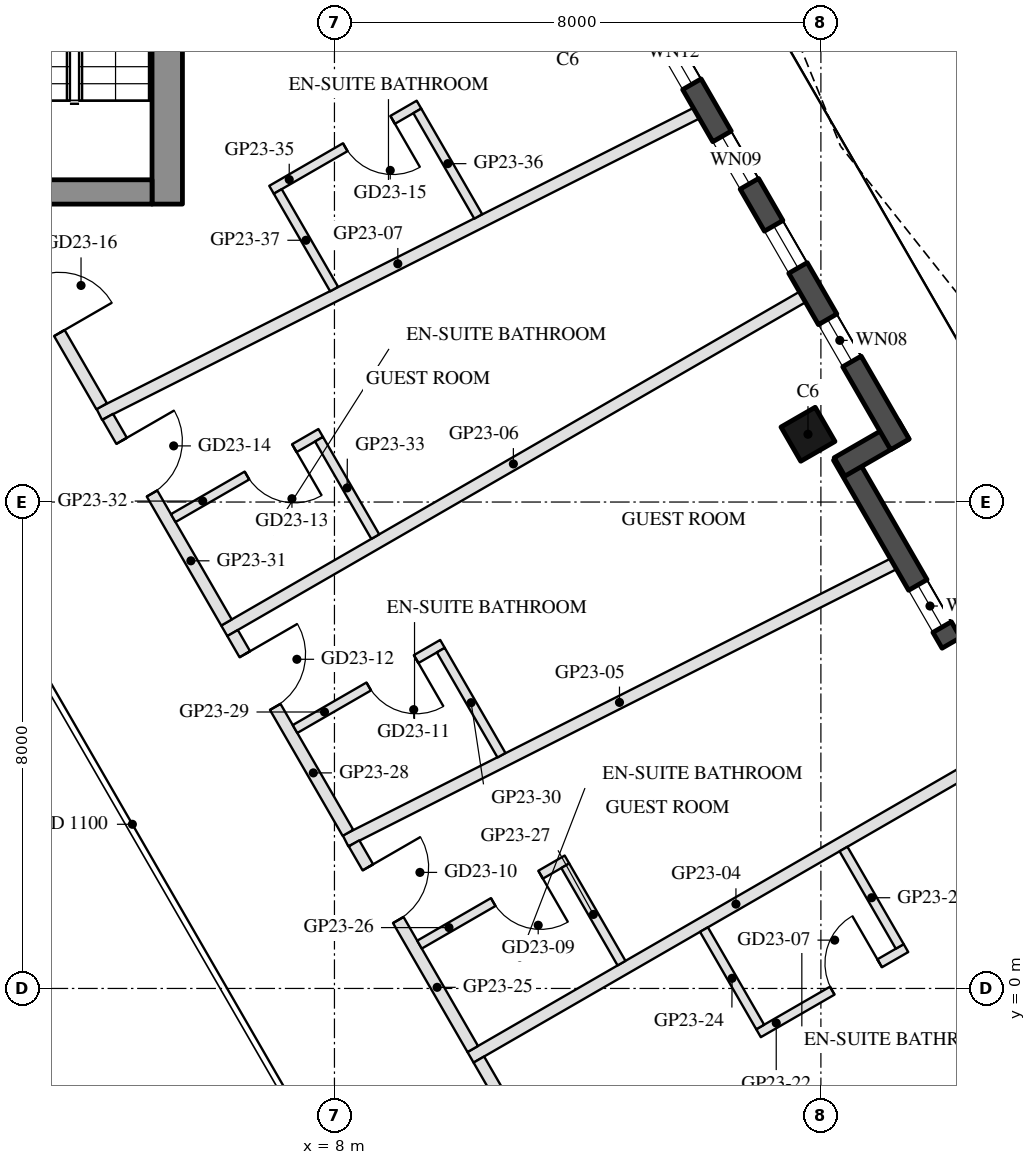
"""IFC4 building model, lengths in metres.
Left out: names, types, materials, properties, quantities, classifications, styles, units other than length and angle.
Written with IfcOpenShell. Run it as: python <this file> out.ifc"""

import sys

from ifc_helpers import new_model, si_unit, direction, frame, frame_2d, origin, origin_2d, place, context, subcontext, project, spatial, rectangle, hollow_rectangle, extrude, boolean, halfspace, element, fill, save


model = new_model("IFC4")
c1 = context("Model", 3, precision=1e-05, world=origin(), true_north=direction((0.0, 1.0)))
c2 = subcontext(c1, "Body", "Model", "MODEL_VIEW")
j1 = project(units=[si_unit("LENGTHUNIT", "METRE"), si_unit("PLANEANGLEUNIT", "RADIAN")], contexts=[c1])
p1 = place(None, origin())
s1 = spatial("IfcSite", under=j1, at=p1, CompositionType="ELEMENT")
p2 = place(p1, origin())
s2 = spatial("IfcBuilding", under=s1, at=p2, CompositionType="ELEMENT")
p3 = place(p2, frame((0.0, 0.0, 250.4)))
s3 = spatial("IfcBuildingStorey", under=s2, at=p3, CompositionType="ELEMENT", Elevation=250.4)
p4 = place(p3, frame((15.788, 9.115, 0.0), z_axis=(0.0, 0.0, 1.0), x_axis=(-0.5, 0.866025403784, 0.0)))
e1 = element("IfcColumn", 1, at=p4, inside=s3, PredefinedType="COLUMN", context=c2, shape_type="SweptSolid", body=[
    boolean("DIFFERENCE", extrude(hollow_rectangle(XDim=0.65, YDim=0.65, WallThickness=0.03, at=origin_2d()), origin(), (0.0, 0.0, 1.0), 3.7), halfspace(frame((0.0, 0.0, 3.663), z_axis=(0.0, 0.0, 1.0), x_axis=(1.0, 0.0, 0.0)), False)),
])
p5 = place(p3, frame((19.729, 2.938, 0.0), z_axis=(0.0, 0.0, 1.0), x_axis=(-0.499976430342, 0.866039011305, 0.0)))
e2 = element("IfcWall", 2, at=p5, inside=s3, PredefinedType="SOLIDWALL", context=c2, shape_type="SweptSolid", body=[
    extrude(rectangle(XDim=6.74, YDim=0.35, at=frame_2d((3.37, 0.0))), origin(), (0.0, 0.0, 1.0), 3.55),
])
p6 = place(p5, frame((1.67, 0.0, 0.0)))
e3 = element("IfcOpeningElement", 3, at=p6, cuts=e2, PredefinedType="OPENING", context=c2, shape_type="SweptSolid", body=[
    extrude(rectangle(XDim=1.5, YDim=2.4, at=frame_2d((0.75, 1.2))), frame((0.0, 0.185, 0.0), z_axis=(0.0, -1.0, 0.0), x_axis=(1.0, 0.0, 0.0)), (0.0, 0.0, 1.0), 0.37),
])
p7 = place(p5, frame((3.47, 0.0, 0.3)))
e4 = element("IfcOpeningElement", 4, at=p7, cuts=e2, PredefinedType="OPENING", context=c2, shape_type="SweptSolid", body=[
    extrude(rectangle(XDim=0.8, YDim=2.65, at=frame_2d((0.4, 1.325))), frame((0.0, 0.185, 0.0), z_axis=(0.0, -1.0, 0.0), x_axis=(1.0, 0.0, 0.0)), (0.0, 0.0, 1.0), 0.37),
])
p8 = place(p3, frame((16.306, 8.577, 0.0), z_axis=(0.0, 0.0, 1.0), x_axis=(0.866092288191, 0.499884134912, 0.0)))
e5 = element("IfcWall", 5, at=p8, inside=s3, PredefinedType="SOLIDWALL", context=c2, shape_type="SweptSolid", body=[
    extrude(rectangle(XDim=1.22, YDim=0.35, at=frame_2d((0.61, 0.0))), origin(), (0.0, 0.0, 1.0), 3.55),
])
p9 = place(p3, frame((17.299, 8.948, 0.0), z_axis=(0.0, 0.0, 1.0), x_axis=(-0.500010041276, 0.866019606374, 0.0)))
e6 = element("IfcWall", 6, at=p9, inside=s3, PredefinedType="SOLIDWALL", context=c2, shape_type="SweptSolid", body=[
    extrude(rectangle(XDim=9.7, YDim=0.35, at=frame_2d((4.85, 0.0))), origin(), (0.0, 0.0, 1.0), 3.55),
])
p10 = place(p9, frame((1.575, 0.0, 0.3)))
e7 = element("IfcOpeningElement", 7, at=p10, cuts=e6, PredefinedType="OPENING", context=c2, shape_type="SweptSolid", body=[
    extrude(rectangle(XDim=0.8, YDim=2.65, at=frame_2d((0.4, 1.325))), frame((0.0, 0.185, 0.0), z_axis=(0.0, -1.0, 0.0), x_axis=(1.0, 0.0, 0.0)), (0.0, 0.0, 1.0), 0.37),
])
p11 = place(p9, frame((3.351, 0.0, 0.3)))
e8 = element("IfcOpeningElement", 8, at=p11, cuts=e6, PredefinedType="OPENING", context=c2, shape_type="SweptSolid", body=[
    extrude(rectangle(XDim=0.8, YDim=2.65, at=frame_2d((0.4, 1.325))), frame((0.0, 0.185, 0.0), z_axis=(0.0, -1.0, 0.0), x_axis=(1.0, 0.0, 0.0)), (0.0, 0.0, 1.0), 0.37),
])
p12 = place(p9, frame((4.949, 0.0, 0.3)))
e9 = element("IfcOpeningElement", 9, at=p12, cuts=e6, PredefinedType="OPENING", context=c2, shape_type="SweptSolid", body=[
    extrude(rectangle(XDim=0.9, YDim=2.65, at=frame_2d((0.45, 1.325))), frame((0.0, 0.185, 0.0), z_axis=(0.0, -1.0, 0.0), x_axis=(1.0, 0.0, 0.0)), (0.0, 0.0, 1.0), 0.37),
])
p13 = place(p9, frame((6.84, 0.0, 0.3)))
e10 = element("IfcOpeningElement", 10, at=p13, cuts=e6, PredefinedType="OPENING", context=c2, shape_type="SweptSolid", body=[
    extrude(rectangle(XDim=1.2, YDim=2.65, at=frame_2d((0.6, 1.325))), frame((0.0, 0.185, 0.0), z_axis=(0.0, -1.0, 0.0), x_axis=(1.0, 0.0, 0.0)), (0.0, 0.0, 1.0), 0.37),
])
p14 = place(p3, frame((5.25, 12.9, 0.0), z_axis=(0.0, 0.0, 1.0), x_axis=(0.0, 1.0, 0.0)))
e11 = element("IfcWall", 11, at=p14, inside=s3, PredefinedType="SHEAR", context=c2, shape_type="SweptSolid", body=[
    extrude(rectangle(XDim=14.837, YDim=0.5, at=frame_2d((7.418, 0.0))), origin(), (0.0, 0.0, 1.0), 3.5),
])
p15 = place(p3, frame((5.0, 13.1, 0.0), z_axis=(0.0, 0.0, 1.0), x_axis=(-1.0, 0.0, 0.0)))
e12 = element("IfcWall", 12, at=p15, inside=s3, PredefinedType="SHEAR", context=c2, shape_type="SweptSolid", body=[
    extrude(rectangle(XDim=10.0, YDim=0.4, at=frame_2d((5.0, 0.0))), origin(), (0.0, 0.0, 1.0), 3.5),
])
p16 = place(p15, frame((3.55, 0.0, 0.0)))
e13 = element("IfcOpeningElement", 13, at=p16, cuts=e12, PredefinedType="OPENING", context=c2, shape_type="SweptSolid", body=[
    extrude(rectangle(XDim=1.1, YDim=2.1, at=frame_2d((0.55, 1.05))), frame((0.0, 0.21, 0.0), z_axis=(0.0, -1.0, 0.0), x_axis=(1.0, 0.0, 0.0)), (0.0, 0.0, 1.0), 0.42),
])
p17 = place(p15, frame((5.85, 0.0, 0.0)))
e14 = element("IfcOpeningElement", 14, at=p17, cuts=e12, PredefinedType="OPENING", context=c2, shape_type="SweptSolid", body=[
    extrude(rectangle(XDim=1.4, YDim=2.1, at=frame_2d((0.7, 1.05))), frame((0.0, 0.21, 0.0), z_axis=(0.0, -1.0, 0.0), x_axis=(1.0, 0.0, 0.0)), (0.0, 0.0, 1.0), 0.42),
])
p18 = place(p3, frame((18.968, 3.907, 0.0), z_axis=(0.0, 0.0, 1.0), x_axis=(-0.866022637375, -0.500004791531, 0.0)))
e15 = element("IfcWall", 15, at=p18, inside=s3, PredefinedType="PARTITIONING", context=c2, shape_type="SweptSolid", body=[
    extrude(rectangle(XDim=10.08, YDim=0.2, at=frame_2d((5.04, 0.0))), origin(), (0.0, 0.0, 1.0), 3.1),
])
p19 = place(p3, frame((17.192, 6.982, 0.0), z_axis=(0.0, 0.0, 1.0), x_axis=(-0.892469554868, -0.451107629766, 0.0)))
e16 = element("IfcWall", 16, at=p19, inside=s3, PredefinedType="PARTITIONING", context=c2, shape_type="SweptSolid", body=[
    extrude(rectangle(XDim=10.096, YDim=0.2, at=frame_2d((5.048, 0.0))), origin(), (0.0, 0.0, 1.0), 3.1),
])
p20 = place(p3, frame((15.697, 11.372, 0.0), z_axis=(0.0, 0.0, 1.0), x_axis=(-0.866027479907, -0.499996404033, 0.0)))
e17 = element("IfcWall", 17, at=p20, inside=s3, PredefinedType="PARTITIONING", context=c2, shape_type="SweptSolid", body=[
    extrude(rectangle(XDim=10.98, YDim=0.2, at=frame_2d((5.49, 0.0))), origin(), (0.0, 0.0, 1.0), 3.1),
])
p21 = place(p3, frame((13.952, 14.395, 0.0), z_axis=(0.0, 0.0, 1.0), x_axis=(-0.892890171934, -0.450274517226, 0.0)))
e18 = element("IfcWall", 18, at=p21, inside=s3, PredefinedType="PARTITIONING", context=c2, shape_type="SweptSolid", body=[
    extrude(rectangle(XDim=10.998, YDim=0.2, at=frame_2d((5.499, 0.0))), origin(), (0.0, 0.0, 1.0), 3.1),
])
p22 = place(p3, frame((10.375, -1.169, 0.0), z_axis=(0.0, 0.0, 1.0), x_axis=(0.500055316652, -0.865993464345, 0.0)))
e19 = element("IfcWall", 19, at=p22, inside=s3, PredefinedType="PARTITIONING", context=c2, shape_type="SweptSolid", body=[
    extrude(rectangle(XDim=3.788, YDim=0.2, at=frame_2d((1.894, 0.0))), origin(), (0.0, 0.0, 1.0), 2.95),
])
p23 = place(p22, frame((1.394, 0.0, 0.0)))
e20 = element("IfcOpeningElement", 20, at=p23, cuts=e19, PredefinedType="OPENING", context=c2, shape_type="SweptSolid", body=[
    extrude(rectangle(XDim=1.0, YDim=2.1, at=frame_2d((0.5, 1.05))), frame((0.0, 0.11, 0.0), z_axis=(0.0, -1.0, 0.0), x_axis=(1.0, 0.0, 0.0)), (0.0, 0.0, 1.0), 0.22),
])
p24 = place(p3, frame((14.974, -0.737, 0.0), z_axis=(0.0, 0.0, 1.0), x_axis=(0.866018616679, 0.500011755427, 0.0)))
e21 = element("IfcWall", 21, at=p24, inside=s3, PredefinedType="PARTITIONING", context=c2, shape_type="SweptSolid", body=[
    extrude(rectangle(XDim=2.8, YDim=0.15, at=frame_2d((1.4, 0.0))), origin(), (0.0, 0.0, 1.0), 3.55),
])
p25 = place(p24, frame((1.4, 0.0, 0.0)))
e22 = element("IfcOpeningElement", 22, at=p25, cuts=e21, PredefinedType="OPENING", context=c2, shape_type="SweptSolid", body=[
    extrude(rectangle(XDim=0.9, YDim=2.1, at=frame_2d((0.45, 1.05))), frame((0.0, 0.085, 0.0), z_axis=(0.0, -1.0, 0.0), x_axis=(1.0, 0.0, 0.0)), (0.0, 0.0, 1.0), 0.17),
])
p26 = place(p3, frame((17.297, 0.691, 0.0), z_axis=(0.0, 0.0, 1.0), x_axis=(-0.499985172903, 0.866033964044, 0.0)))
e23 = element("IfcWall", 23, at=p26, inside=s3, PredefinedType="PARTITIONING", context=c2, shape_type="SweptSolid", body=[
    extrude(rectangle(XDim=1.85, YDim=0.15, at=frame_2d((0.925, 0.0))), origin(), (0.0, 0.0, 1.0), 2.95),
])
p27 = place(p3, frame((15.002, -0.634, 0.0), z_axis=(0.0, 0.0, 1.0), x_axis=(-0.500042316284, 0.866000971088, 0.0)))
e24 = element("IfcWall", 24, at=p27, inside=s3, PredefinedType="PARTITIONING", context=c2, shape_type="SweptSolid", body=[
    extrude(rectangle(XDim=1.85, YDim=0.15, at=frame_2d((0.925, 0.0))), origin(), (0.0, 0.0, 1.0), 2.95),
])
p28 = place(p3, frame((8.322, 2.386, 0.0), z_axis=(0.0, 0.0, 1.0), x_axis=(0.499998439657, -0.866026304647, 0.0)))
e25 = element("IfcWall", 25, at=p28, inside=s3, PredefinedType="PARTITIONING", context=c2, shape_type="SweptSolid", body=[
    extrude(rectangle(XDim=3.905, YDim=0.2, at=frame_2d((1.953, 0.0))), origin(), (0.0, 0.0, 1.0), 2.95),
])
p29 = place(p28, frame((0.455, 0.0, 0.0)))
e26 = element("IfcOpeningElement", 26, at=p29, cuts=e25, PredefinedType="OPENING", context=c2, shape_type="SweptSolid", body=[
    extrude(rectangle(XDim=1.0, YDim=2.1, at=frame_2d((0.5, 1.05))), frame((0.0, 0.11, 0.0), z_axis=(0.0, -1.0, 0.0), x_axis=(1.0, 0.0, 0.0)), (0.0, 0.0, 1.0), 0.22),
])
p30 = place(p3, frame((11.823, 2.121, 0.0), z_axis=(0.0, 0.0, 1.0), x_axis=(-0.866034573852, -0.49998411664, 0.0)))
e27 = element("IfcWall", 27, at=p30, inside=s3, PredefinedType="PARTITIONING", context=c2, shape_type="SweptSolid", body=[
    extrude(rectangle(XDim=2.8, YDim=0.15, at=frame_2d((1.4, 0.0))), origin(), (0.0, 0.0, 1.0), 2.95),
])
p31 = place(p30, frame((0.5, 0.0, 0.0)))
e28 = element("IfcOpeningElement", 28, at=p31, cuts=e27, PredefinedType="OPENING", context=c2, shape_type="SweptSolid", body=[
    extrude(rectangle(XDim=0.9, YDim=2.1, at=frame_2d((0.45, 1.05))), frame((0.0, 0.085, 0.0), z_axis=(0.0, -1.0, 0.0), x_axis=(1.0, 0.0, 0.0)), (0.0, 0.0, 1.0), 0.17),
])
p32 = place(p3, frame((12.721, 0.416, 0.0), z_axis=(0.0, 0.0, 1.0), x_axis=(-0.499985172903, 0.866033964044, 0.0)))
e29 = element("IfcWall", 29, at=p32, inside=s3, PredefinedType="PARTITIONING", context=c2, shape_type="SweptSolid", body=[
    extrude(rectangle(XDim=1.85, YDim=0.15, at=frame_2d((0.925, 0.0))), origin(), (0.0, 0.0, 1.0), 3.55),
])
p33 = place(p3, frame((6.325, 5.845, 0.0), z_axis=(0.0, 0.0, 1.0), x_axis=(0.499973105789, -0.866040930607, 0.0)))
e30 = element("IfcWall", 30, at=p33, inside=s3, PredefinedType="PARTITIONING", context=c2, shape_type="SweptSolid", body=[
    extrude(rectangle(XDim=3.794, YDim=0.2, at=frame_2d((1.897, 0.0))), origin(), (0.0, 0.0, 1.0), 2.95),
])
p34 = place(p33, frame((0.403, 0.0, 0.0)))
e31 = element("IfcOpeningElement", 31, at=p34, cuts=e30, PredefinedType="OPENING", context=c2, shape_type="SweptSolid", body=[
    extrude(rectangle(XDim=1.0, YDim=2.1, at=frame_2d((0.5, 1.05))), frame((0.0, 0.11, 0.0), z_axis=(0.0, -1.0, 0.0), x_axis=(1.0, 0.0, 0.0)), (0.0, 0.0, 1.0), 0.22),
])
p35 = place(p3, frame((9.776, 5.667, 0.0), z_axis=(0.0, 0.0, 1.0), x_axis=(-0.866034573852, -0.49998411664, 0.0)))
e32 = element("IfcWall", 32, at=p35, inside=s3, PredefinedType="PARTITIONING", context=c2, shape_type="SweptSolid", body=[
    extrude(rectangle(XDim=2.8, YDim=0.15, at=frame_2d((1.4, 0.0))), origin(), (0.0, 0.0, 1.0), 2.95),
])
p36 = place(p35, frame((0.5, 0.0, 0.0)))
e33 = element("IfcOpeningElement", 33, at=p36, cuts=e32, PredefinedType="OPENING", context=c2, shape_type="SweptSolid", body=[
    extrude(rectangle(XDim=0.9, YDim=2.1, at=frame_2d((0.45, 1.05))), frame((0.0, 0.085, 0.0), z_axis=(0.0, -1.0, 0.0), x_axis=(1.0, 0.0, 0.0)), (0.0, 0.0, 1.0), 0.17),
])
p37 = place(p3, frame((10.747, 3.836, 0.0), z_axis=(0.0, 0.0, 1.0), x_axis=(-0.499980071345, 0.866036909293, 0.0)))
e34 = element("IfcWall", 34, at=p37, inside=s3, PredefinedType="PARTITIONING", context=c2, shape_type="SweptSolid", body=[
    extrude(rectangle(XDim=1.996, YDim=0.15, at=frame_2d((0.998, 0.0))), origin(), (0.0, 0.0, 1.0), 2.95),
])
p38 = place(p3, frame((4.272, 9.401, 0.0), z_axis=(0.0, 0.0, 1.0), x_axis=(0.499998439657, -0.866026304647, 0.0)))
e35 = element("IfcWall", 35, at=p38, inside=s3, PredefinedType="PARTITIONING", context=c2, shape_type="SweptSolid", body=[
    extrude(rectangle(XDim=3.905, YDim=0.2, at=frame_2d((1.953, 0.0))), origin(), (0.0, 0.0, 1.0), 2.95),
])
p39 = place(p38, frame((0.456, 0.0, 0.0)))
e36 = element("IfcOpeningElement", 36, at=p39, cuts=e35, PredefinedType="OPENING", context=c2, shape_type="SweptSolid", body=[
    extrude(rectangle(XDim=1.0, YDim=2.1, at=frame_2d((0.5, 1.05))), frame((0.0, 0.11, 0.0), z_axis=(0.0, -1.0, 0.0), x_axis=(1.0, 0.0, 0.0)), (0.0, 0.0, 1.0), 0.22),
])
p40 = place(p3, frame((7.774, 9.136, 0.0), z_axis=(0.0, 0.0, 1.0), x_axis=(-0.866056369097, -0.49994636267, 0.0)))
e37 = element("IfcWall", 37, at=p40, inside=s3, PredefinedType="PARTITIONING", context=c2, shape_type="SweptSolid", body=[
    extrude(rectangle(XDim=2.8, YDim=0.15, at=frame_2d((1.4, 0.0))), origin(), (0.0, 0.0, 1.0), 2.95),
])
p41 = place(p40, frame((0.5, 0.0, 0.0)))
e38 = element("IfcOpeningElement", 38, at=p41, cuts=e37, PredefinedType="OPENING", context=c2, shape_type="SweptSolid", body=[
    extrude(rectangle(XDim=0.9, YDim=2.1, at=frame_2d((0.45, 1.05))), frame((0.0, 0.085, 0.0), z_axis=(0.0, -1.0, 0.0), x_axis=(1.0, 0.0, 0.0)), (0.0, 0.0, 1.0), 0.17),
])
p42 = place(p3, frame((8.671, 7.431, 0.0), z_axis=(0.0, 0.0, 1.0), x_axis=(-0.500042316284, 0.866000971088, 0.0)))
e39 = element("IfcWall", 39, at=p42, inside=s3, PredefinedType="PARTITIONING", context=c2, shape_type="SweptSolid", body=[
    extrude(rectangle(XDim=1.85, YDim=0.15, at=frame_2d((0.925, 0.0))), origin(), (0.0, 0.0, 1.0), 2.95),
])
p43 = place(p3, frame((2.281, 12.85, 0.0), z_axis=(0.0, 0.0, 1.0), x_axis=(0.499985062256, -0.866034027923, 0.0)))
e40 = element("IfcWall", 40, at=p43, inside=s3, PredefinedType="PARTITIONING", context=c2, shape_type="SweptSolid", body=[
    extrude(rectangle(XDim=3.782, YDim=0.2, at=frame_2d((1.891, 0.0))), origin(), (0.0, 0.0, 1.0), 2.95),
])
p44 = place(p43, frame((1.391, 0.0, 0.0)))
e41 = element("IfcOpeningElement", 41, at=p44, cuts=e40, PredefinedType="OPENING", context=c2, shape_type="SweptSolid", body=[
    extrude(rectangle(XDim=1.0, YDim=2.1, at=frame_2d((0.5, 1.05))), frame((0.0, 0.11, 0.0), z_axis=(0.0, -1.0, 0.0), x_axis=(1.0, 0.0, 0.0)), (0.0, 0.0, 1.0), 0.22),
])
p45 = place(p3, frame((9.39, 14.536, 0.0), z_axis=(0.0, 0.0, 1.0), x_axis=(-0.866034573852, -0.49998411664, 0.0)))
e42 = element("IfcWall", 42, at=p45, inside=s3, PredefinedType="PARTITIONING", context=c2, shape_type="SweptSolid", body=[
    extrude(rectangle(XDim=2.8, YDim=0.15, at=frame_2d((1.4, 0.0))), origin(), (0.0, 0.0, 1.0), 2.95),
])
p46 = place(p45, frame((0.5, 0.0, 0.0)))
e43 = element("IfcOpeningElement", 43, at=p46, cuts=e42, PredefinedType="OPENING", context=c2, shape_type="SweptSolid", body=[
    extrude(rectangle(XDim=0.9, YDim=2.1, at=frame_2d((0.45, 1.05))), frame((0.0, 0.085, 0.0), z_axis=(0.0, -1.0, 0.0), x_axis=(1.0, 0.0, 0.0)), (0.0, 0.0, 1.0), 0.17),
])
p47 = place(p3, frame((10.365, 12.698, 0.0), z_axis=(0.0, 0.0, 1.0), x_axis=(-0.500056363668, 0.86599285976, 0.0)))
e44 = element("IfcWall", 44, at=p47, inside=s3, PredefinedType="PARTITIONING", context=c2, shape_type="SweptSolid", body=[
    extrude(rectangle(XDim=2.004, YDim=0.15, at=frame_2d((1.002, 0.0))), origin(), (0.0, 0.0, 1.0), 2.95),
])
p48 = place(p3, frame((7.995, 11.502, 0.0), z_axis=(0.0, 0.0, 1.0), x_axis=(-0.4999770169, 0.866038672677, 0.0)))
e45 = element("IfcWall", 45, at=p48, inside=s3, PredefinedType="PARTITIONING", context=c2, shape_type="SweptSolid", body=[
    extrude(rectangle(XDim=1.854, YDim=0.15, at=frame_2d((0.927, 0.0))), origin(), (0.0, 0.0, 1.0), 2.95),
])
p49 = place(p6, frame((1.5, 0.0, 0.0), z_axis=(0.0, 0.0, 1.0), x_axis=(-1.0, 0.0, 0.0)))
e46 = element("IfcDoor", 46, at=p49, inside=s3, OperationType="SLIDING_TO_LEFT", PredefinedType="DOOR", context=c2, shape_type="SweptSolid", body=[
    extrude(rectangle(XDim=1.5, YDim=2.4, at=frame_2d((0.75, 1.2))), frame((0.0, 0.025, 0.0), z_axis=(0.0, -1.0, 0.0), x_axis=(1.0, 0.0, 0.0)), (0.0, 0.0, 1.0), 0.05),
])
fill(e3, e46)
p50 = place(p7, origin())
e47 = element("IfcWindow", 47, at=p50, inside=s3, PartitioningType="SINGLE_PANEL", PredefinedType="WINDOW", context=c2, shape_type="SweptSolid", body=[
    extrude(rectangle(XDim=0.8, YDim=2.65, at=frame_2d((0.4, 1.325))), frame((0.0, 0.03, 0.0), z_axis=(0.0, -1.0, 0.0), x_axis=(1.0, 0.0, 0.0)), (0.0, 0.0, 1.0), 0.06),
])
fill(e4, e47)
p51 = place(p10, origin())
e48 = element("IfcWindow", 48, at=p51, inside=s3, PartitioningType="SINGLE_PANEL", PredefinedType="WINDOW", context=c2, shape_type="SweptSolid", body=[
    extrude(rectangle(XDim=0.8, YDim=2.65, at=frame_2d((0.4, 1.325))), frame((0.0, 0.03, 0.0), z_axis=(0.0, -1.0, 0.0), x_axis=(1.0, 0.0, 0.0)), (0.0, 0.0, 1.0), 0.06),
])
fill(e7, e48)
p52 = place(p11, origin())
e49 = element("IfcWindow", 49, at=p52, inside=s3, PartitioningType="SINGLE_PANEL", PredefinedType="WINDOW", context=c2, shape_type="SweptSolid", body=[
    extrude(rectangle(XDim=0.8, YDim=2.65, at=frame_2d((0.4, 1.325))), frame((0.0, 0.03, 0.0), z_axis=(0.0, -1.0, 0.0), x_axis=(1.0, 0.0, 0.0)), (0.0, 0.0, 1.0), 0.06),
])
fill(e8, e49)
p53 = place(p12, origin())
e50 = element("IfcWindow", 50, at=p53, inside=s3, PartitioningType="SINGLE_PANEL", PredefinedType="WINDOW", context=c2, shape_type="SweptSolid", body=[
    extrude(rectangle(XDim=0.9, YDim=2.65, at=frame_2d((0.45, 1.325))), frame((0.0, 0.03, 0.0), z_axis=(0.0, -1.0, 0.0), x_axis=(1.0, 0.0, 0.0)), (0.0, 0.0, 1.0), 0.06),
])
fill(e9, e50)
p54 = place(p13, origin())
e51 = element("IfcWindow", 51, at=p54, inside=s3, PartitioningType="SINGLE_PANEL", PredefinedType="WINDOW", context=c2, shape_type="SweptSolid", body=[
    extrude(rectangle(XDim=1.2, YDim=2.65, at=frame_2d((0.6, 1.325))), frame((0.0, 0.03, 0.0), z_axis=(0.0, -1.0, 0.0), x_axis=(1.0, 0.0, 0.0)), (0.0, 0.0, 1.0), 0.06),
])
fill(e10, e51)
p55 = place(p25, origin())
e52 = element("IfcDoor", 52, at=p55, inside=s3, OperationType="SINGLE_SWING_RIGHT", PredefinedType="DOOR", context=c2, shape_type="SweptSolid", body=[
    extrude(rectangle(XDim=0.9, YDim=2.1, at=frame_2d((0.45, 1.05))), frame((0.0, 0.025, 0.0), z_axis=(0.0, -1.0, 0.0), x_axis=(1.0, 0.0, 0.0)), (0.0, 0.0, 1.0), 0.05),
])
fill(e22, e52)
p56 = place(p31, origin())
e53 = element("IfcDoor", 53, at=p56, inside=s3, OperationType="SINGLE_SWING_LEFT", PredefinedType="DOOR", context=c2, shape_type="SweptSolid", body=[
    extrude(rectangle(XDim=0.9, YDim=2.1, at=frame_2d((0.45, 1.05))), frame((0.0, 0.025, 0.0), z_axis=(0.0, -1.0, 0.0), x_axis=(1.0, 0.0, 0.0)), (0.0, 0.0, 1.0), 0.05),
])
fill(e28, e53)
p57 = place(p29, origin())
e54 = element("IfcDoor", 54, at=p57, inside=s3, OperationType="SINGLE_SWING_LEFT", PredefinedType="DOOR", context=c2, shape_type="SweptSolid", body=[
    extrude(rectangle(XDim=1.0, YDim=2.1, at=frame_2d((0.5, 1.05))), frame((0.0, 0.025, 0.0), z_axis=(0.0, -1.0, 0.0), x_axis=(1.0, 0.0, 0.0)), (0.0, 0.0, 1.0), 0.05),
])
fill(e26, e54)
p58 = place(p36, origin())
e55 = element("IfcDoor", 55, at=p58, inside=s3, OperationType="SINGLE_SWING_LEFT", PredefinedType="DOOR", context=c2, shape_type="SweptSolid", body=[
    extrude(rectangle(XDim=0.9, YDim=2.1, at=frame_2d((0.45, 1.05))), frame((0.0, 0.025, 0.0), z_axis=(0.0, -1.0, 0.0), x_axis=(1.0, 0.0, 0.0)), (0.0, 0.0, 1.0), 0.05),
])
fill(e33, e55)
p59 = place(p34, origin())
e56 = element("IfcDoor", 56, at=p59, inside=s3, OperationType="SINGLE_SWING_LEFT", PredefinedType="DOOR", context=c2, shape_type="SweptSolid", body=[
    extrude(rectangle(XDim=1.0, YDim=2.1, at=frame_2d((0.5, 1.05))), frame((0.0, 0.025, 0.0), z_axis=(0.0, -1.0, 0.0), x_axis=(1.0, 0.0, 0.0)), (0.0, 0.0, 1.0), 0.05),
])
fill(e31, e56)
p60 = place(p41, origin())
e57 = element("IfcDoor", 57, at=p60, inside=s3, OperationType="SINGLE_SWING_LEFT", PredefinedType="DOOR", context=c2, shape_type="SweptSolid", body=[
    extrude(rectangle(XDim=0.9, YDim=2.1, at=frame_2d((0.45, 1.05))), frame((0.0, 0.025, 0.0), z_axis=(0.0, -1.0, 0.0), x_axis=(1.0, 0.0, 0.0)), (0.0, 0.0, 1.0), 0.05),
])
fill(e38, e57)
p61 = place(p39, origin())
e58 = element("IfcDoor", 58, at=p61, inside=s3, OperationType="SINGLE_SWING_LEFT", PredefinedType="DOOR", context=c2, shape_type="SweptSolid", body=[
    extrude(rectangle(XDim=1.0, YDim=2.1, at=frame_2d((0.5, 1.05))), frame((0.0, 0.025, 0.0), z_axis=(0.0, -1.0, 0.0), x_axis=(1.0, 0.0, 0.0)), (0.0, 0.0, 1.0), 0.05),
])
fill(e36, e58)
p62 = place(p46, origin())
e59 = element("IfcDoor", 59, at=p62, inside=s3, OperationType="SINGLE_SWING_LEFT", PredefinedType="DOOR", context=c2, shape_type="SweptSolid", body=[
    extrude(rectangle(XDim=0.9, YDim=2.1, at=frame_2d((0.45, 1.05))), frame((0.0, 0.025, 0.0), z_axis=(0.0, -1.0, 0.0), x_axis=(1.0, 0.0, 0.0)), (0.0, 0.0, 1.0), 0.05),
])
fill(e43, e59)
p63 = place(p44, origin())
e60 = element("IfcDoor", 60, at=p63, inside=s3, OperationType="SINGLE_SWING_RIGHT", PredefinedType="DOOR", context=c2, shape_type="SweptSolid", body=[
    extrude(rectangle(XDim=1.0, YDim=2.1, at=frame_2d((0.5, 1.05))), frame((0.0, 0.025, 0.0), z_axis=(0.0, -1.0, 0.0), x_axis=(1.0, 0.0, 0.0)), (0.0, 0.0, 1.0), 0.05),
])
fill(e41, e60)
save(model, sys.argv[1])
